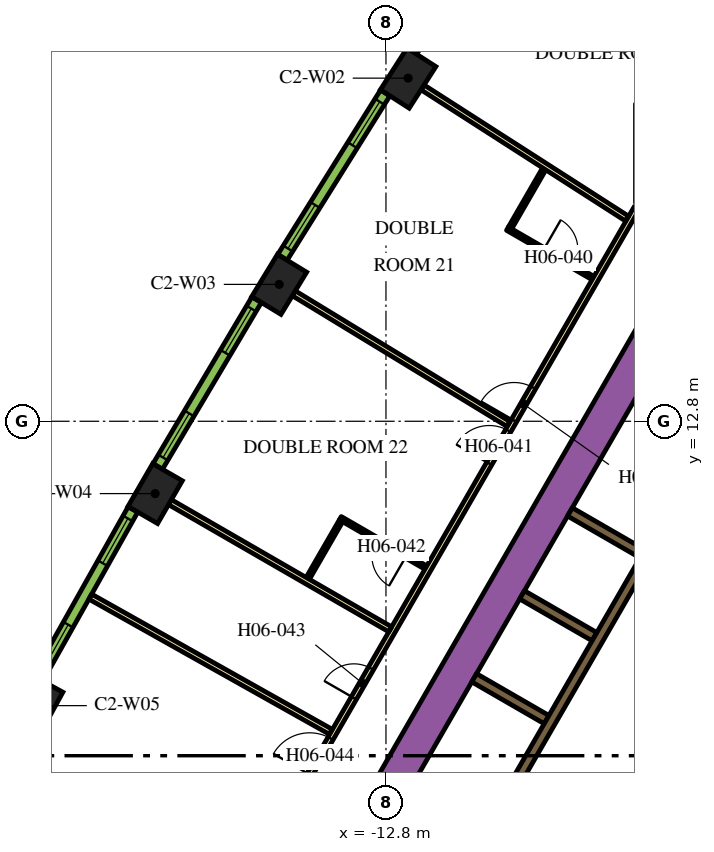
"""IFC4 building model, lengths in metres.
Left out: names, types, materials, properties, quantities, classifications, styles, units other than length and angle.
Written with IfcOpenShell. Run it as: python <this file> out.ifc"""

import sys

from ifc_helpers import new_model, si_unit, direction, frame, frame_2d, origin, origin_2d, place, context, subcontext, project, spatial, rectangle, extrude, element, fill, save


model = new_model("IFC4")
c1 = context("Model", 3, precision=1e-05, world=origin(), true_north=direction((0.0, 1.0)))
c2 = subcontext(c1, "Body", "Model", "MODEL_VIEW")
j1 = project(units=[si_unit("LENGTHUNIT", "METRE"), si_unit("PLANEANGLEUNIT", "RADIAN")], contexts=[c1])
p1 = place(None, origin())
s1 = spatial("IfcSite", under=j1, at=p1, CompositionType="ELEMENT")
p2 = place(p1, origin())
s2 = spatial("IfcBuilding", under=s1, at=p2, CompositionType="ELEMENT")
p3 = place(p2, frame((0.0, 0.0, 87.6)))
s3 = spatial("IfcBuildingStorey", under=s2, at=p3, CompositionType="ELEMENT", Elevation=87.6)
for number, where, z_axis, x_axis in (
    (1, (-12.217, 21.828, 0.0), (0.0, 0.0, 1.0), (-0.54, -0.842, 0.0)),
    (2, (-15.609, 16.402, 0.0), (0.0, 0.0, 1.0), (-0.52, -0.854, 0.0)),
    (3, (-18.874, 10.897, 0.0), (0.0, 0.0, 1.0), (-0.5, -0.866, 0.0)),
    (4, (-22.009, 5.317, 0.0), (0.0, 0.0, 1.0), (-0.48, -0.877, 0.0)),
):
    element("IfcColumn", number, at=place(p3, frame(where, z_axis=z_axis, x_axis=x_axis)), inside=s3, PredefinedType="COLUMN", context=c2, shape_type="SweptSolid", body=[
        extrude(rectangle(XDim=1.3, YDim=0.9, at=origin_2d()), origin(), (0.0, 0.0, 1.0), 3.9),
    ])
p4 = place(p3, frame((-15.36, -1.503, 0.0), z_axis=(0.0, 0.0, 1.0), x_axis=(0.50000389221, 0.866023156604, 0.0)))
e5 = element("IfcWall", 5, at=p4, inside=s3, PredefinedType="SOLIDWALL", context=c2, shape_type="SweptSolid", body=[
    extrude(rectangle(XDim=21.0, YDim=0.9, at=frame_2d((10.5, 0.0))), origin(), (0.0, 0.0, 1.0), 3.9),
])
p5 = place(p3, frame((-8.06, -1.311, 0.0), z_axis=(0.0, 0.0, 1.0), x_axis=(0.50000273126, 0.866023826885, 0.0)))
e6 = element("IfcWall", 6, at=p5, inside=s3, PredefinedType="SOLIDWALL", context=c2, shape_type="SweptSolid", body=[
    extrude(rectangle(XDim=10.33, YDim=0.25, at=frame_2d((5.165, 0.0))), origin(), (0.0, 0.0, 1.0), 3.9),
])
for number, where, z_axis, x_axis in (
    (7, (-8.574, 4.95, 0.0), (0.0, 0.0, 1.0), (-0.866, 0.5, 0.0)),
    (8, (-7.314, 7.132, 0.0), (0.0, 0.0, 1.0), (-0.866, 0.5, 0.0)),
):
    element("IfcWall", number, at=place(p3, frame(where, z_axis=z_axis, x_axis=x_axis)), inside=s3, PredefinedType="SOLIDWALL", context=c2, shape_type="SweptSolid", body=[
        extrude(rectangle(XDim=2.2, YDim=0.25, at=frame_2d((1.1, 0.0))), origin(), (0.0, 0.0, 1.0), 3.9),
    ])
p6 = place(p3, frame((-7.959, 10.415, 0.0), z_axis=(0.0, 0.0, 1.0), x_axis=(0.866020958405, -0.500007699544, 0.0)))
e9 = element("IfcWall", 9, at=p6, inside=s3, PredefinedType="SOLIDWALL", context=c2, shape_type="SweptSolid", body=[
    extrude(rectangle(XDim=4.1, YDim=0.25, at=frame_2d((2.05, 0.0))), origin(), (0.0, 0.0, 1.0), 3.9),
])
p7 = place(p3, frame((-6.008, 9.144, 0.0), z_axis=(0.0, 0.0, 1.0), x_axis=(-0.500006956611, -0.866021387346, 0.0)))
e10 = element("IfcWall", 10, at=p7, inside=s3, PredefinedType="SOLIDWALL", context=c2, shape_type="SweptSolid", body=[
    extrude(rectangle(XDim=9.83, YDim=0.25, at=frame_2d((4.915, 0.0))), origin(), (0.0, 0.0, 1.0), 3.9),
])
p8 = place(p7, frame((6.985, 0.0, 0.0)))
e11 = element("IfcOpeningElement", 11, at=p8, cuts=e10, PredefinedType="OPENING", context=c2, shape_type="SweptSolid", body=[
    extrude(rectangle(XDim=0.9, YDim=2.1, at=frame_2d((0.45, 1.05))), frame((0.0, 0.135, 0.0), z_axis=(0.0, -1.0, 0.0), x_axis=(1.0, 0.0, 0.0)), (0.0, 0.0, 1.0), 0.27),
])
p9 = place(p3, frame((-19.081, -3.9, 0.0), z_axis=(0.0, 0.0, 1.0), x_axis=(0.499998313975, 0.866026377209, 0.0)))
e12 = element("IfcWall", 12, at=p9, inside=s3, PredefinedType="PARTITIONING", context=c2, shape_type="SweptSolid", body=[
    extrude(rectangle(XDim=25.766, YDim=0.15, at=frame_2d((12.883, 0.0))), origin(), (0.0, 0.0, 1.0), 2.75),
])
p10 = place(p9, frame((19.306, 0.0, 0.0)))
e13 = element("IfcOpeningElement", 13, at=p10, cuts=e12, PredefinedType="OPENING", context=c2, shape_type="SweptSolid", body=[
    extrude(rectangle(XDim=1.0, YDim=2.1, at=frame_2d((0.5, 1.05))), frame((0.0, 0.085, 0.0), z_axis=(0.0, -1.0, 0.0), x_axis=(1.0, 0.0, 0.0)), (0.0, 0.0, 1.0), 0.17),
])
p11 = place(p9, frame((18.0, 0.0, 0.0)))
e14 = element("IfcOpeningElement", 14, at=p11, cuts=e12, PredefinedType="OPENING", context=c2, shape_type="SweptSolid", body=[
    extrude(rectangle(XDim=1.0, YDim=2.1, at=frame_2d((0.5, 1.05))), frame((0.0, 0.085, 0.0), z_axis=(0.0, -1.0, 0.0), x_axis=(1.0, 0.0, 0.0)), (0.0, 0.0, 1.0), 0.17),
])
p12 = place(p9, frame((10.874, 0.0, 0.0)))
e15 = element("IfcOpeningElement", 15, at=p12, cuts=e12, PredefinedType="OPENING", context=c2, shape_type="SweptSolid", body=[
    extrude(rectangle(XDim=0.9, YDim=2.1, at=frame_2d((0.45, 1.05))), frame((0.0, 0.085, 0.0), z_axis=(0.0, -1.0, 0.0), x_axis=(1.0, 0.0, 0.0)), (0.0, 0.0, 1.0), 0.17),
])
p13 = place(p9, frame((8.548, 0.0, 0.0)))
e16 = element("IfcOpeningElement", 16, at=p13, cuts=e12, PredefinedType="OPENING", context=c2, shape_type="SweptSolid", body=[
    extrude(rectangle(XDim=1.1, YDim=2.1, at=frame_2d((0.55, 1.05))), frame((0.0, 0.085, 0.0), z_axis=(0.0, -1.0, 0.0), x_axis=(1.0, 0.0, 0.0)), (0.0, 0.0, 1.0), 0.17),
])
p14 = place(p9, frame((0.18, 0.0, 0.0)))
e17 = element("IfcOpeningElement", 17, at=p14, cuts=e12, PredefinedType="OPENING", context=c2, shape_type="SweptSolid", body=[
    extrude(rectangle(XDim=1.0, YDim=2.1, at=frame_2d((0.5, 1.05))), frame((0.0, 0.085, 0.0), z_axis=(0.0, -1.0, 0.0), x_axis=(1.0, 0.0, 0.0)), (0.0, 0.0, 1.0), 0.17),
])
p15 = place(p3, frame((-20.581, 8.185, 0.0), z_axis=(0.0, 0.0, 1.0), x_axis=(0.871820720803, -0.489825102233, 0.0)))
e18 = element("IfcWall", 18, at=p15, inside=s3, PredefinedType="PARTITIONING", context=c2, shape_type="SweptSolid", body=[
    extrude(rectangle(XDim=7.257, YDim=0.15, at=frame_2d((3.628, 0.0))), origin(), (0.0, 0.0, 1.0), 2.75),
])
p16 = place(p3, frame((-18.484, 10.672, 0.0), z_axis=(0.0, 0.0, 1.0), x_axis=(0.866019162053, -0.50001081084, 0.0)))
e19 = element("IfcWall", 19, at=p16, inside=s3, PredefinedType="PARTITIONING", context=c2, shape_type="SweptSolid", body=[
    extrude(rectangle(XDim=6.694, YDim=0.15, at=frame_2d((3.347, 0.0))), origin(), (0.0, 0.0, 1.0), 2.75),
])
p17 = place(p3, frame((-15.225, 16.167, 0.0), z_axis=(0.0, 0.0, 1.0), x_axis=(0.854088713274, -0.520127359266, 0.0)))
e20 = element("IfcWall", 20, at=p17, inside=s3, PredefinedType="PARTITIONING", context=c2, shape_type="SweptSolid", body=[
    extrude(rectangle(XDim=6.611, YDim=0.15, at=frame_2d((3.305, 0.0))), origin(), (0.0, 0.0, 1.0), 2.75),
])
p18 = place(p3, frame((-11.838, 21.585, 0.0), z_axis=(0.0, 0.0, 1.0), x_axis=(0.841699322813, -0.539946525108, 0.0)))
e21 = element("IfcWall", 21, at=p18, inside=s3, PredefinedType="PARTITIONING", context=c2, shape_type="SweptSolid", body=[
    extrude(rectangle(XDim=6.392, YDim=0.15, at=frame_2d((3.196, 0.0))), origin(), (0.0, 0.0, 1.0), 2.75),
])
p19 = place(p3, frame((-8.326, 26.923, 0.0), z_axis=(0.0, 0.0, 1.0), x_axis=(0.828836601893, -0.5594907393, 0.0)))
e22 = element("IfcWall", 22, at=p19, inside=s3, PredefinedType="PARTITIONING", context=c2, shape_type="SweptSolid", body=[
    extrude(rectangle(XDim=8.909, YDim=0.15, at=frame_2d((4.455, 0.0))), origin(), (0.0, 0.0, 1.0), 2.75),
])
p20 = place(p3, frame((-9.603, 17.868, 0.0), z_axis=(0.0, 0.0, 1.0), x_axis=(0.866021400173, -0.500006934395, 0.0)))
e23 = element("IfcWall", 23, at=p20, inside=s3, PredefinedType="PARTITIONING", context=c2, shape_type="SweptSolid", body=[
    extrude(rectangle(XDim=2.6, YDim=0.1, at=frame_2d((1.3, 0.0))), origin(), (0.0, 0.0, 1.0), 2.75),
])
p21 = place(p20, frame((1.1, 0.0, 0.0)))
e24 = element("IfcOpeningElement", 24, at=p21, cuts=e23, PredefinedType="OPENING", context=c2, shape_type="SweptSolid", body=[
    extrude(rectangle(XDim=0.9, YDim=2.1, at=frame_2d((0.45, 1.05))), frame((0.0, 0.06, 0.0), z_axis=(0.0, -1.0, 0.0), x_axis=(1.0, 0.0, 0.0)), (0.0, 0.0, 1.0), 0.12),
])
p22 = place(p3, frame((-9.534, 17.886, 0.0), z_axis=(0.0, 0.0, 1.0), x_axis=(0.500041240653, 0.866001592173, 0.0)))
e25 = element("IfcWall", 25, at=p22, inside=s3, PredefinedType="PARTITIONING", context=c2, shape_type="SweptSolid", body=[
    extrude(rectangle(XDim=1.79, YDim=0.1, at=frame_2d((0.895, 0.0))), origin(), (0.0, 0.0, 1.0), 2.75),
])
p23 = place(p3, frame((-11.75, 8.949, 0.0), z_axis=(0.0, 0.0, 1.0), x_axis=(-0.865997922154, 0.500047596559, 0.0)))
e26 = element("IfcWall", 26, at=p23, inside=s3, PredefinedType="PARTITIONING", context=c2, shape_type="SweptSolid", body=[
    extrude(rectangle(XDim=2.6, YDim=0.1, at=frame_2d((1.3, 0.0))), origin(), (0.0, 0.0, 1.0), 2.75),
])
p24 = place(p23, frame((0.6, 0.0, 0.0)))
e27 = element("IfcOpeningElement", 27, at=p24, cuts=e26, PredefinedType="OPENING", context=c2, shape_type="SweptSolid", body=[
    extrude(rectangle(XDim=0.9, YDim=2.1, at=frame_2d((0.45, 1.05))), frame((0.0, 0.06, 0.0), z_axis=(0.0, -1.0, 0.0), x_axis=(1.0, 0.0, 0.0)), (0.0, 0.0, 1.0), 0.12),
])
p25 = place(p3, frame((-13.983, 10.181, 0.0), z_axis=(0.0, 0.0, 1.0), x_axis=(-0.499980071345, -0.866036909293, 0.0)))
e28 = element("IfcWall", 28, at=p25, inside=s3, PredefinedType="PARTITIONING", context=c2, shape_type="SweptSolid", body=[
    extrude(rectangle(XDim=1.75, YDim=0.1, at=frame_2d((0.875, 0.0))), origin(), (0.0, 0.0, 1.0), 2.75),
])
p26 = place(p3, frame((-9.311, 26.799, 0.0), z_axis=(0.0, 0.0, 1.0), x_axis=(-0.549741341923, -0.835334937005, 0.0)))
e29 = element("IfcWall", 29, at=p26, inside=s3, PredefinedType="SOLIDWALL", context=c2, shape_type="SweptSolid", body=[
    extrude(rectangle(XDim=5.1, YDim=0.29, at=frame_2d((2.55, 0.0))), origin(), (0.0, 0.0, 1.0), 3.65),
])
p27 = place(p26, frame((0.273, 0.0, 0.9)))
e30 = element("IfcOpeningElement", 30, at=p27, cuts=e29, PredefinedType="OPENING", context=c2, shape_type="SweptSolid", body=[
    extrude(rectangle(XDim=1.35, YDim=2.15, at=frame_2d((0.675, 1.075))), frame((0.0, 0.155, 0.0), z_axis=(0.0, -1.0, 0.0), x_axis=(1.0, 0.0, 0.0)), (0.0, 0.0, 1.0), 0.31),
])
p28 = place(p26, frame((3.478, 0.0, 0.9)))
e31 = element("IfcOpeningElement", 31, at=p28, cuts=e29, PredefinedType="OPENING", context=c2, shape_type="SweptSolid", body=[
    extrude(rectangle(XDim=1.35, YDim=2.15, at=frame_2d((0.675, 1.075))), frame((0.0, 0.155, 0.0), z_axis=(0.0, -1.0, 0.0), x_axis=(1.0, 0.0, 0.0)), (0.0, 0.0, 1.0), 0.31),
])
p29 = place(p3, frame((-12.82, 21.439, 0.0), z_axis=(0.0, 0.0, 1.0), x_axis=(-0.530072082134, -0.847952585787, 0.0)))
e32 = element("IfcWall", 32, at=p29, inside=s3, PredefinedType="SOLIDWALL", context=c2, shape_type="SweptSolid", body=[
    extrude(rectangle(XDim=5.1, YDim=0.29, at=frame_2d((2.55, 0.0))), origin(), (0.0, 0.0, 1.0), 3.65),
])
p30 = place(p29, frame((0.273, 0.0, 0.9)))
e33 = element("IfcOpeningElement", 33, at=p30, cuts=e32, PredefinedType="OPENING", context=c2, shape_type="SweptSolid", body=[
    extrude(rectangle(XDim=1.35, YDim=2.15, at=frame_2d((0.675, 1.075))), frame((0.0, 0.155, 0.0), z_axis=(0.0, -1.0, 0.0), x_axis=(1.0, 0.0, 0.0)), (0.0, 0.0, 1.0), 0.31),
])
p31 = place(p29, frame((3.478, 0.0, 0.9)))
e34 = element("IfcOpeningElement", 34, at=p31, cuts=e32, PredefinedType="OPENING", context=c2, shape_type="SweptSolid", body=[
    extrude(rectangle(XDim=1.35, YDim=2.15, at=frame_2d((0.675, 1.075))), frame((0.0, 0.155, 0.0), z_axis=(0.0, -1.0, 0.0), x_axis=(1.0, 0.0, 0.0)), (0.0, 0.0, 1.0), 0.31),
])
p32 = place(p3, frame((-16.203, 15.998, 0.0), z_axis=(0.0, 0.0, 1.0), x_axis=(-0.510054281659, -0.860142214847, 0.0)))
e35 = element("IfcWall", 35, at=p32, inside=s3, PredefinedType="SOLIDWALL", context=c2, shape_type="SweptSolid", body=[
    extrude(rectangle(XDim=5.101, YDim=0.29, at=frame_2d((2.55, 0.0))), origin(), (0.0, 0.0, 1.0), 3.65),
])
p33 = place(p32, frame((0.273, 0.0, 0.9)))
e36 = element("IfcOpeningElement", 36, at=p33, cuts=e35, PredefinedType="OPENING", context=c2, shape_type="SweptSolid", body=[
    extrude(rectangle(XDim=1.35, YDim=2.15, at=frame_2d((0.675, 1.075))), frame((0.0, 0.155, 0.0), z_axis=(0.0, -1.0, 0.0), x_axis=(1.0, 0.0, 0.0)), (0.0, 0.0, 1.0), 0.31),
])
p34 = place(p32, frame((3.478, 0.0, 0.9)))
e37 = element("IfcOpeningElement", 37, at=p34, cuts=e35, PredefinedType="OPENING", context=c2, shape_type="SweptSolid", body=[
    extrude(rectangle(XDim=1.35, YDim=2.15, at=frame_2d((0.675, 1.075))), frame((0.0, 0.155, 0.0), z_axis=(0.0, -1.0, 0.0), x_axis=(1.0, 0.0, 0.0)), (0.0, 0.0, 1.0), 0.31),
])
p35 = place(p3, frame((-19.458, 10.48, 0.0), z_axis=(0.0, 0.0, 1.0), x_axis=(-0.48983164787, -0.87181704316, 0.0)))
e38 = element("IfcWall", 38, at=p35, inside=s3, PredefinedType="SOLIDWALL", context=c2, shape_type="SweptSolid", body=[
    extrude(rectangle(XDim=5.1, YDim=0.29, at=frame_2d((2.55, 0.0))), origin(), (0.0, 0.0, 1.0), 3.65),
])
p36 = place(p35, frame((0.272, 0.0, 0.9)))
e39 = element("IfcOpeningElement", 39, at=p36, cuts=e38, PredefinedType="OPENING", context=c2, shape_type="SweptSolid", body=[
    extrude(rectangle(XDim=1.35, YDim=2.15, at=frame_2d((0.675, 1.075))), frame((0.0, 0.155, 0.0), z_axis=(0.0, -1.0, 0.0), x_axis=(1.0, 0.0, 0.0)), (0.0, 0.0, 1.0), 0.31),
])
p37 = place(p35, frame((3.478, 0.0, 0.9)))
e40 = element("IfcOpeningElement", 40, at=p37, cuts=e38, PredefinedType="OPENING", context=c2, shape_type="SweptSolid", body=[
    extrude(rectangle(XDim=1.35, YDim=2.15, at=frame_2d((0.675, 1.075))), frame((0.0, 0.155, 0.0), z_axis=(0.0, -1.0, 0.0), x_axis=(1.0, 0.0, 0.0)), (0.0, 0.0, 1.0), 0.31),
])
p38 = place(p10, origin())
e41 = element("IfcDoor", 41, at=p38, inside=s3, OperationType="SINGLE_SWING_LEFT", PredefinedType="DOOR", context=c2, shape_type="SweptSolid", body=[
    extrude(rectangle(XDim=1.0, YDim=2.1, at=frame_2d((0.5, 1.05))), frame((0.0, 0.025, 0.0), z_axis=(0.0, -1.0, 0.0), x_axis=(1.0, 0.0, 0.0)), (0.0, 0.0, 1.0), 0.05),
])
fill(e13, e41)
p39 = place(p21, origin())
e42 = element("IfcDoor", 42, at=p39, inside=s3, OperationType="SINGLE_SWING_RIGHT", PredefinedType="DOOR", context=c2, shape_type="SweptSolid", body=[
    extrude(rectangle(XDim=0.9, YDim=2.1, at=frame_2d((0.45, 1.05))), frame((0.0, 0.025, 0.0), z_axis=(0.0, -1.0, 0.0), x_axis=(1.0, 0.0, 0.0)), (0.0, 0.0, 1.0), 0.05),
])
fill(e24, e42)
p40 = place(p11, origin())
e43 = element("IfcDoor", 43, at=p40, inside=s3, OperationType="SINGLE_SWING_RIGHT", PredefinedType="DOOR", context=c2, shape_type="SweptSolid", body=[
    extrude(rectangle(XDim=1.0, YDim=2.1, at=frame_2d((0.5, 1.05))), frame((0.0, 0.025, 0.0), z_axis=(0.0, -1.0, 0.0), x_axis=(1.0, 0.0, 0.0)), (0.0, 0.0, 1.0), 0.05),
])
fill(e14, e43)
p41 = place(p24, origin())
e44 = element("IfcDoor", 44, at=p41, inside=s3, OperationType="SINGLE_SWING_LEFT", PredefinedType="DOOR", context=c2, shape_type="SweptSolid", body=[
    extrude(rectangle(XDim=0.9, YDim=2.1, at=frame_2d((0.45, 1.05))), frame((0.0, 0.025, 0.0), z_axis=(0.0, -1.0, 0.0), x_axis=(1.0, 0.0, 0.0)), (0.0, 0.0, 1.0), 0.05),
])
fill(e27, e44)
p42 = place(p12, origin())
e45 = element("IfcDoor", 45, at=p42, inside=s3, OperationType="SINGLE_SWING_LEFT", PredefinedType="DOOR", context=c2, shape_type="SweptSolid", body=[
    extrude(rectangle(XDim=0.9, YDim=2.1, at=frame_2d((0.45, 1.05))), frame((0.0, 0.025, 0.0), z_axis=(0.0, -1.0, 0.0), x_axis=(1.0, 0.0, 0.0)), (0.0, 0.0, 1.0), 0.05),
])
fill(e15, e45)
p43 = place(p13, origin())
e46 = element("IfcDoor", 46, at=p43, inside=s3, OperationType="SINGLE_SWING_RIGHT", PredefinedType="DOOR", context=c2, shape_type="SweptSolid", body=[
    extrude(rectangle(XDim=1.1, YDim=2.1, at=frame_2d((0.55, 1.05))), frame((0.0, 0.025, 0.0), z_axis=(0.0, -1.0, 0.0), x_axis=(1.0, 0.0, 0.0)), (0.0, 0.0, 1.0), 0.05),
])
fill(e16, e46)
p44 = place(p30, origin())
e47 = element("IfcWindow", 47, at=p44, inside=s3, PartitioningType="DOUBLE_PANEL_VERTICAL", PredefinedType="WINDOW", context=c2, shape_type="SweptSolid", body=[
    extrude(rectangle(XDim=1.35, YDim=2.15, at=frame_2d((0.675, 1.075))), frame((0.0, 0.015, 0.0), z_axis=(0.0, -1.0, 0.0), x_axis=(1.0, 0.0, 0.0)), (0.0, 0.0, 1.0), 0.06),
])
fill(e33, e47)
p45 = place(p31, origin())
e48 = element("IfcWindow", 48, at=p45, inside=s3, PartitioningType="DOUBLE_PANEL_VERTICAL", PredefinedType="WINDOW", context=c2, shape_type="SweptSolid", body=[
    extrude(rectangle(XDim=1.35, YDim=2.15, at=frame_2d((0.675, 1.075))), frame((0.0, 0.015, 0.0), z_axis=(0.0, -1.0, 0.0), x_axis=(1.0, 0.0, 0.0)), (0.0, 0.0, 1.0), 0.06),
])
fill(e34, e48)
p46 = place(p33, origin())
e49 = element("IfcWindow", 49, at=p46, inside=s3, PartitioningType="DOUBLE_PANEL_VERTICAL", PredefinedType="WINDOW", context=c2, shape_type="SweptSolid", body=[
    extrude(rectangle(XDim=1.35, YDim=2.15, at=frame_2d((0.675, 1.075))), frame((0.0, 0.015, 0.0), z_axis=(0.0, -1.0, 0.0), x_axis=(1.0, 0.0, 0.0)), (0.0, 0.0, 1.0), 0.06),
])
fill(e36, e49)
p47 = place(p34, origin())
e50 = element("IfcWindow", 50, at=p47, inside=s3, PartitioningType="DOUBLE_PANEL_VERTICAL", PredefinedType="WINDOW", context=c2, shape_type="SweptSolid", body=[
    extrude(rectangle(XDim=1.35, YDim=2.15, at=frame_2d((0.675, 1.075))), frame((0.0, 0.015, 0.0), z_axis=(0.0, -1.0, 0.0), x_axis=(1.0, 0.0, 0.0)), (0.0, 0.0, 1.0), 0.06),
])
fill(e37, e50)
p48 = place(p36, origin())
e51 = element("IfcWindow", 51, at=p48, inside=s3, PartitioningType="DOUBLE_PANEL_VERTICAL", PredefinedType="WINDOW", context=c2, shape_type="SweptSolid", body=[
    extrude(rectangle(XDim=1.35, YDim=2.15, at=frame_2d((0.675, 1.075))), frame((0.0, 0.015, 0.0), z_axis=(0.0, -1.0, 0.0), x_axis=(1.0, 0.0, 0.0)), (0.0, 0.0, 1.0), 0.06),
])
fill(e39, e51)
p49 = place(p37, origin())
e52 = element("IfcWindow", 52, at=p49, inside=s3, PartitioningType="DOUBLE_PANEL_VERTICAL", PredefinedType="WINDOW", context=c2, shape_type="SweptSolid", body=[
    extrude(rectangle(XDim=1.35, YDim=2.15, at=frame_2d((0.675, 1.075))), frame((0.0, 0.015, 0.0), z_axis=(0.0, -1.0, 0.0), x_axis=(1.0, 0.0, 0.0)), (0.0, 0.0, 1.0), 0.06),
])
fill(e40, e52)
save(model, sys.argv[1])
